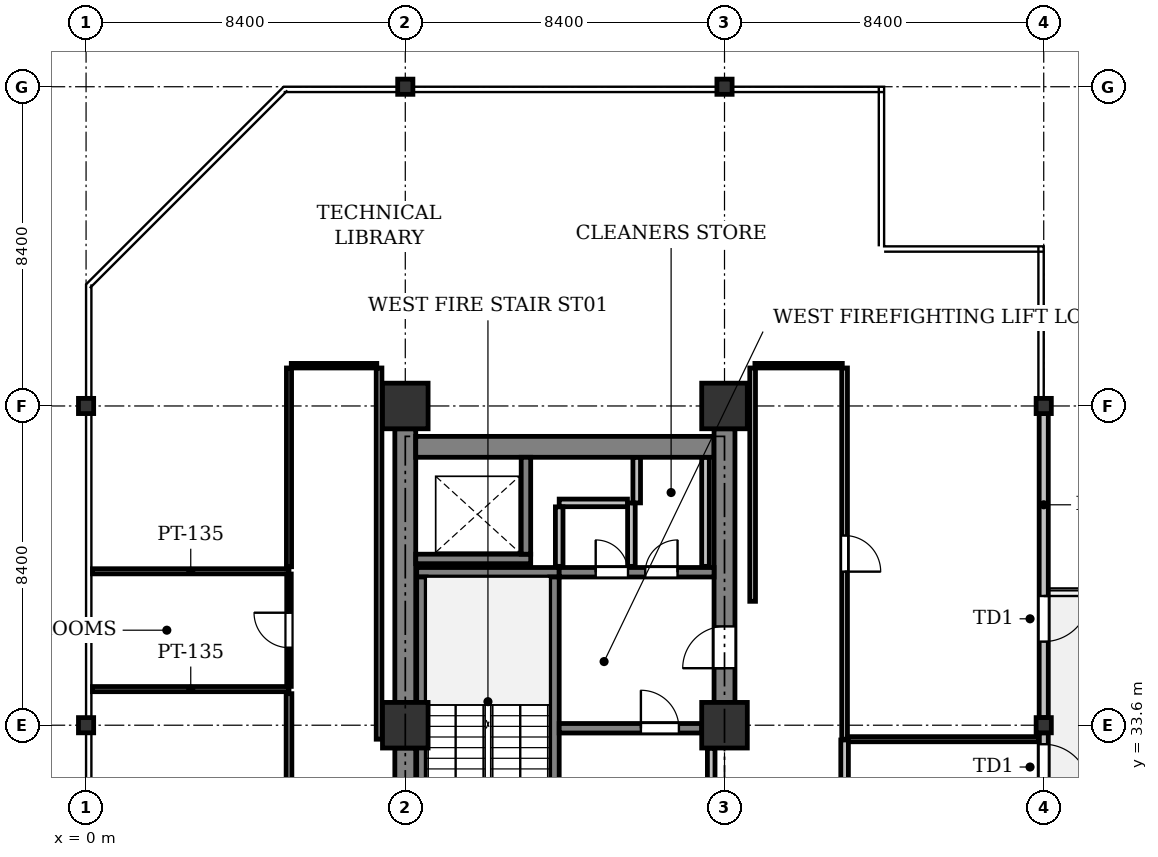
"""IFC4 building model, lengths in metres.
Left out: names, types, materials, properties, quantities, classifications, styles, units other than length and angle.
Written with IfcOpenShell. Run it as: python <this file> out.ifc"""

import sys

from ifc_helpers import new_model, si_unit, direction, frame, frame_2d, origin, origin_2d, place, context, subcontext, project, spatial, rectangle, i_section, extrude, element, fill, save


model = new_model("IFC4")
c1 = context("Model", 3, precision=1e-05, world=origin(), true_north=direction((0.0, 1.0)))
c2 = subcontext(c1, "Body", "Model", "MODEL_VIEW")
j1 = project(units=[si_unit("LENGTHUNIT", "METRE"), si_unit("PLANEANGLEUNIT", "RADIAN")], contexts=[c1])
p1 = place(None, origin())
s1 = spatial("IfcSite", under=j1, at=p1, CompositionType="ELEMENT")
p2 = place(p1, origin())
s2 = spatial("IfcBuilding", under=s1, at=p2, CompositionType="ELEMENT")
p3 = place(p2, frame((0.0, 0.0, 129.5)))
s3 = spatial("IfcBuildingStorey", under=s2, at=p3, CompositionType="ELEMENT", Elevation=129.5)
for number, where, z_axis, x_axis in (
    (1, (0.0, 33.6, 0.0), (0.0, 0.0, 1.0), (1.0, 0.0, 0.0)),
    (2, (0.0, 42.0, 0.0), (0.0, 0.0, 1.0), (1.0, 0.0, 0.0)),
):
    element("IfcColumn", number, at=place(p3, frame(where, z_axis=z_axis, x_axis=x_axis)), inside=s3, PredefinedType="COLUMN", context=c2, shape_type="SweptSolid", body=[
        extrude(i_section(OverallWidth=0.4, OverallDepth=0.4, WebThickness=0.025, FlangeThickness=0.04, at=origin_2d()), origin(), (0.0, 0.0, 1.0), 4.1),
    ])
for number, where, z_axis, x_axis in (
    (3, (8.4, 33.6, 0.0), (0.0, 0.0, 1.0), (1.0, 0.0, 0.0)),
    (4, (8.4, 42.0, 0.0), (0.0, 0.0, 1.0), (1.0, 0.0, 0.0)),
):
    element("IfcColumn", number, at=place(p3, frame(where, z_axis=z_axis, x_axis=x_axis)), inside=s3, PredefinedType="COLUMN", context=c2, shape_type="SweptSolid", body=[
        extrude(rectangle(XDim=1.2, YDim=1.2, at=origin_2d()), origin(), (0.0, 0.0, 1.0), 4.1),
    ])
p4 = place(p3, frame((8.4, 50.4, 0.0), z_axis=(0.0, 0.0, 1.0), x_axis=(1.0, 0.0, 0.0)))
e5 = element("IfcColumn", 5, at=p4, inside=s3, PredefinedType="COLUMN", context=c2, shape_type="SweptSolid", body=[
    extrude(i_section(OverallWidth=0.4, OverallDepth=0.4, WebThickness=0.025, FlangeThickness=0.04, at=origin_2d()), origin(), (0.0, 0.0, 1.0), 4.1),
])
for number, where, z_axis, x_axis in (
    (6, (16.8, 33.6, 0.0), (0.0, 0.0, 1.0), (1.0, 0.0, 0.0)),
    (7, (16.8, 42.0, 0.0), (0.0, 0.0, 1.0), (1.0, 0.0, 0.0)),
):
    element("IfcColumn", number, at=place(p3, frame(where, z_axis=z_axis, x_axis=x_axis)), inside=s3, PredefinedType="COLUMN", context=c2, shape_type="SweptSolid", body=[
        extrude(rectangle(XDim=1.2, YDim=1.2, at=origin_2d()), origin(), (0.0, 0.0, 1.0), 4.1),
    ])
for number, where, z_axis, x_axis in (
    (8, (16.8, 50.4, 0.0), (0.0, 0.0, 1.0), (1.0, 0.0, 0.0)),
    (9, (25.2, 33.6, 0.0), (0.0, 0.0, 1.0), (1.0, 0.0, 0.0)),
    (10, (25.2, 42.0, 0.0), (0.0, 0.0, 1.0), (1.0, 0.0, 0.0)),
):
    element("IfcColumn", number, at=place(p3, frame(where, z_axis=z_axis, x_axis=x_axis)), inside=s3, PredefinedType="COLUMN", context=c2, shape_type="SweptSolid", body=[
        extrude(i_section(OverallWidth=0.4, OverallDepth=0.4, WebThickness=0.025, FlangeThickness=0.04, at=origin_2d()), origin(), (0.0, 0.0, 1.0), 4.1),
    ])
p5 = place(p3, frame((25.2, 41.8, 0.0), z_axis=(0.0, 0.0, 1.0), x_axis=(0.0, -1.0, 0.0)))
e11 = element("IfcWall", 11, at=p5, inside=s3, PredefinedType="STANDARD", context=c2, shape_type="SweptSolid", body=[
    extrude(rectangle(XDim=8.0, YDim=0.24, at=frame_2d((4.0, 0.0))), origin(), (0.0, 0.0, 1.0), 3.422),
])
p6 = place(p5, frame((4.8, 0.0, 0.0)))
e12 = element("IfcOpeningElement", 12, at=p6, cuts=e11, PredefinedType="OPENING", context=c2, shape_type="SweptSolid", body=[
    extrude(rectangle(XDim=1.2, YDim=2.2, at=frame_2d((0.6, 1.1))), frame((0.0, 0.13, 0.0), z_axis=(0.0, -1.0, 0.0), x_axis=(1.0, 0.0, 0.0)), (0.0, 0.0, 1.0), 0.26),
])
p7 = place(p3, frame((25.2, 33.4, 0.0), z_axis=(0.0, 0.0, 1.0), x_axis=(0.0, -1.0, 0.0)))
e13 = element("IfcWall", 13, at=p7, inside=s3, PredefinedType="STANDARD", context=c2, shape_type="SweptSolid", body=[
    extrude(rectangle(XDim=8.0, YDim=0.24, at=frame_2d((4.0, 0.0))), origin(), (0.0, 0.0, 1.0), 3.422),
])
p8 = place(p7, frame((0.3, 0.0, 0.0)))
e14 = element("IfcOpeningElement", 14, at=p8, cuts=e13, PredefinedType="OPENING", context=c2, shape_type="SweptSolid", body=[
    extrude(rectangle(XDim=1.2, YDim=2.2, at=frame_2d((0.6, 1.1))), frame((0.0, 0.13, 0.0), z_axis=(0.0, -1.0, 0.0), x_axis=(1.0, 0.0, 0.0)), (0.0, 0.0, 1.0), 0.26),
])
p9 = place(p7, frame((3.299, 0.0, 0.9)))
e15 = element("IfcOpeningElement", 15, at=p9, cuts=e13, PredefinedType="OPENING", context=c2, shape_type="SweptSolid", body=[
    extrude(rectangle(XDim=1.5, YDim=1.6, at=frame_2d((0.75, 0.8))), frame((0.0, 0.13, 0.0), z_axis=(0.0, -1.0, 0.0), x_axis=(1.0, 0.0, 0.0)), (0.0, 0.0, 1.0), 0.26),
])
for number, where, z_axis, x_axis in (
    (16, (8.4, 25.8, 0.0), (0.0, 0.0, 1.0), (0.0, 1.0, 0.0)),
    (17, (8.4, 34.2, 0.0), (0.0, 0.0, 1.0), (0.0, 1.0, 0.0)),
):
    element("IfcWall", number, at=place(p3, frame(where, z_axis=z_axis, x_axis=x_axis)), inside=s3, PredefinedType="SHEAR", context=c2, shape_type="SweptSolid", body=[
        extrude(rectangle(XDim=7.2, YDim=0.55, at=frame_2d((3.6, 0.0))), origin(), (0.0, 0.0, 1.0), 3.825),
    ])
p10 = place(p3, frame((8.675, 40.925, 0.0), z_axis=(0.0, 0.0, 1.0), x_axis=(1.0, 0.0, 0.0)))
e18 = element("IfcWall", 18, at=p10, inside=s3, PredefinedType="SHEAR", context=c2, shape_type="SweptSolid", body=[
    extrude(rectangle(XDim=7.85, YDim=0.55, at=frame_2d((3.925, 0.0))), origin(), (0.0, 0.0, 1.0), 3.825),
])
p11 = place(p3, frame((16.8, 34.2, 0.0), z_axis=(0.0, 0.0, 1.0), x_axis=(0.0, 1.0, 0.0)))
e19 = element("IfcWall", 19, at=p11, inside=s3, PredefinedType="SHEAR", context=c2, shape_type="SweptSolid", body=[
    extrude(rectangle(XDim=7.2, YDim=0.55, at=frame_2d((3.6, 0.0))), origin(), (0.0, 0.0, 1.0), 3.825),
])
p12 = place(p11, frame((0.9, 0.0, 0.0)))
e20 = element("IfcOpeningElement", 20, at=p12, cuts=e19, PredefinedType="OPENING", context=c2, shape_type="SweptSolid", body=[
    extrude(rectangle(XDim=1.1, YDim=2.15, at=frame_2d((0.55, 1.075))), frame((0.0, 0.285, 0.0), z_axis=(0.0, -1.0, 0.0), x_axis=(1.0, 0.0, 0.0)), (0.0, 0.0, 1.0), 0.57),
])
p13 = place(p3, frame((12.45, 37.625, 0.0), z_axis=(0.0, 0.0, 1.0), x_axis=(-1.0, 0.0, 0.0)))
e21 = element("IfcWall", 21, at=p13, inside=s3, PredefinedType="SHEAR", context=c2, shape_type="SweptSolid", body=[
    extrude(rectangle(XDim=3.75, YDim=0.25, at=frame_2d((1.875, 0.0))), origin(), (0.0, 0.0, 1.0), 3.825),
])
p14 = place(p3, frame((12.325, 29.75, 0.0), z_axis=(0.0, 0.0, 1.0), x_axis=(0.0, 1.0, 0.0)))
e22 = element("IfcWall", 22, at=p14, inside=s3, PredefinedType="SHEAR", context=c2, shape_type="SweptSolid", body=[
    extrude(rectangle(XDim=7.75, YDim=0.25, at=frame_2d((3.875, 0.0))), origin(), (0.0, 0.0, 1.0), 3.825),
])
p15 = place(p14, frame((0.22, 0.0, 0.0)))
e23 = element("IfcOpeningElement", 23, at=p15, cuts=e22, PredefinedType="OPENING", context=c2, shape_type="SweptSolid", body=[
    extrude(rectangle(XDim=1.1, YDim=2.15, at=frame_2d((0.55, 1.075))), frame((0.0, 0.135, 0.0), z_axis=(0.0, -1.0, 0.0), x_axis=(1.0, 0.0, 0.0)), (0.0, 0.0, 1.0), 0.27),
])
p16 = place(p3, frame((8.825, 29.75, 0.0), z_axis=(0.0, 0.0, 1.0), x_axis=(0.0, 1.0, 0.0)))
e24 = element("IfcWall", 24, at=p16, inside=s3, PredefinedType="SHEAR", context=c2, shape_type="SweptSolid", body=[
    extrude(rectangle(XDim=7.75, YDim=0.25, at=frame_2d((3.875, 0.0))), origin(), (0.0, 0.0, 1.0), 3.825),
])
p17 = place(p3, frame((8.675, 37.975, 0.0), z_axis=(0.0, 0.0, 1.0), x_axis=(1.0, 0.0, 0.0)))
e25 = element("IfcWall", 25, at=p17, inside=s3, PredefinedType="SHEAR", context=c2, shape_type="SweptSolid", body=[
    extrude(rectangle(XDim=3.025, YDim=0.25, at=frame_2d((1.512, 0.0))), origin(), (0.0, 0.0, 1.0), 3.825),
])
p18 = place(p3, frame((11.575, 38.1, 0.0), z_axis=(0.0, 0.0, 1.0), x_axis=(0.0, 1.0, 0.0)))
e26 = element("IfcWall", 26, at=p18, inside=s3, PredefinedType="SHEAR", context=c2, shape_type="SweptSolid", body=[
    extrude(rectangle(XDim=2.55, YDim=0.25, at=frame_2d((1.275, 0.0))), origin(), (0.0, 0.0, 1.0), 3.825),
])
p19 = place(p3, frame((12.45, 33.52, 0.0), z_axis=(0.0, 0.0, 1.0), x_axis=(1.0, 0.0, 0.0)))
e27 = element("IfcWall", 27, at=p19, inside=s3, PredefinedType="SHEAR", context=c2, shape_type="SweptSolid", body=[
    extrude(rectangle(XDim=3.75, YDim=0.25, at=frame_2d((1.875, 0.0))), origin(), (0.0, 0.0, 1.0), 3.825),
])
p20 = place(p19, frame((2.15, 0.0, 0.0)))
e28 = element("IfcOpeningElement", 28, at=p20, cuts=e27, PredefinedType="OPENING", context=c2, shape_type="SweptSolid", body=[
    extrude(rectangle(XDim=1.0, YDim=2.15, at=frame_2d((0.5, 1.075))), frame((0.0, 0.135, 0.0), z_axis=(0.0, -1.0, 0.0), x_axis=(1.0, 0.0, 0.0)), (0.0, 0.0, 1.0), 0.27),
])
p21 = place(p3, frame((12.45, 37.625, 0.0), z_axis=(0.0, 0.0, 1.0), x_axis=(1.0, 0.0, 0.0)))
e29 = element("IfcWall", 29, at=p21, inside=s3, PredefinedType="SHEAR", context=c2, shape_type="SweptSolid", body=[
    extrude(rectangle(XDim=4.075, YDim=0.25, at=frame_2d((2.038, 0.0))), origin(), (0.0, 0.0, 1.0), 3.825),
])
p22 = place(p21, frame((0.96, 0.0, 0.0)))
e30 = element("IfcOpeningElement", 30, at=p22, cuts=e29, PredefinedType="OPENING", context=c2, shape_type="SweptSolid", body=[
    extrude(rectangle(XDim=0.85, YDim=2.15, at=frame_2d((0.425, 1.075))), frame((0.0, 0.135, 0.0), z_axis=(0.0, -1.0, 0.0), x_axis=(1.0, 0.0, 0.0)), (0.0, 0.0, 1.0), 0.27),
])
p23 = place(p21, frame((2.264, 0.0, 0.0)))
e31 = element("IfcOpeningElement", 31, at=p23, cuts=e29, PredefinedType="OPENING", context=c2, shape_type="SweptSolid", body=[
    extrude(rectangle(XDim=0.85, YDim=2.15, at=frame_2d((0.425, 1.075))), frame((0.0, 0.135, 0.0), z_axis=(0.0, -1.0, 0.0), x_axis=(1.0, 0.0, 0.0)), (0.0, 0.0, 1.0), 0.27),
])
p24 = place(p3, frame((16.45, 31.0, 0.0), z_axis=(0.0, 0.0, 1.0), x_axis=(0.0, 1.0, 0.0)))
e32 = element("IfcWall", 32, at=p24, inside=s3, PredefinedType="PARTITIONING", context=c2, shape_type="SweptSolid", body=[
    extrude(rectangle(XDim=1.995, YDim=0.2, at=frame_2d((0.998, 0.0))), origin(), (0.0, 0.0, 1.0), 3.825),
])
p25 = place(p3, frame((14.35, 37.78, 0.0), z_axis=(0.0, 0.0, 1.0), x_axis=(0.0, 1.0, 0.0)))
e33 = element("IfcWall", 33, at=p25, inside=s3, PredefinedType="PARTITIONING", context=c2, shape_type="SweptSolid", body=[
    extrude(rectangle(XDim=1.67, YDim=0.2, at=frame_2d((0.835, 0.0))), origin(), (0.0, 0.0, 1.0), 2.725),
])
p26 = place(p3, frame((14.246, 39.45, 0.0), z_axis=(0.0, 0.0, 1.0), x_axis=(-1.0, 0.0, 0.0)))
e34 = element("IfcWall", 34, at=p26, inside=s3, PredefinedType="PARTITIONING", context=c2, shape_type="SweptSolid", body=[
    extrude(rectangle(XDim=1.796, YDim=0.2, at=frame_2d((0.898, 0.0))), origin(), (0.0, 0.0, 1.0), 2.725),
])
p27 = place(p3, frame((12.45, 39.346, 0.0), z_axis=(0.0, 0.0, 1.0), x_axis=(0.0, -1.0, 0.0)))
e35 = element("IfcWall", 35, at=p27, inside=s3, PredefinedType="PARTITIONING", context=c2, shape_type="SweptSolid", body=[
    extrude(rectangle(XDim=1.566, YDim=0.2, at=frame_2d((0.783, 0.0))), origin(), (0.0, 0.0, 1.0), 2.725),
])
p28 = place(p3, frame((16.3, 37.78, 0.0), z_axis=(0.0, 0.0, 1.0), x_axis=(0.0, 1.0, 0.0)))
e36 = element("IfcWall", 36, at=p28, inside=s3, PredefinedType="PARTITIONING", context=c2, shape_type="SweptSolid", body=[
    extrude(rectangle(XDim=2.866, YDim=0.2, at=frame_2d((1.433, 0.0))), origin(), (0.0, 0.0, 1.0), 2.725),
])
p29 = place(p3, frame((14.49, 40.646, 0.0), z_axis=(0.0, 0.0, 1.0), x_axis=(0.0, -1.0, 0.0)))
e37 = element("IfcWall", 37, at=p29, inside=s3, PredefinedType="PARTITIONING", context=c2, shape_type="SweptSolid", body=[
    extrude(rectangle(XDim=1.196, YDim=0.2, at=frame_2d((0.598, 0.0))), origin(), (0.0, 0.0, 1.0), 2.725),
])
for number, where, z_axis, x_axis in (
    (38, (5.34, 37.65, 0.0), (0.0, 0.0, 1.0), (-1.0, 0.0, 0.0)),
    (39, (0.169, 34.55, 0.0), (0.0, 0.0, 1.0), (1.0, 0.0, 0.0)),
):
    element("IfcWall", number, at=place(p3, frame(where, z_axis=z_axis, x_axis=x_axis)), inside=s3, PredefinedType="PARTITIONING", context=c2, shape_type="SweptSolid", body=[
        extrude(rectangle(XDim=5.171, YDim=0.135, at=frame_2d((2.585, 0.0))), origin(), (0.0, 0.0, 1.0), 3.469),
    ])
p30 = place(p3, frame((5.34, 34.622, 0.0), z_axis=(0.0, 0.0, 1.0), x_axis=(0.0, 1.0, 0.0)))
e40 = element("IfcWall", 40, at=p30, inside=s3, PredefinedType="PARTITIONING", context=c2, shape_type="SweptSolid", body=[
    extrude(rectangle(XDim=2.957, YDim=0.12, at=frame_2d((1.479, 0.0))), origin(), (0.0, 0.0, 1.0), 3.825),
])
p31 = place(p30, frame((1.019, 0.0, 0.0)))
e41 = element("IfcOpeningElement", 41, at=p31, cuts=e40, PredefinedType="OPENING", context=c2, shape_type="SweptSolid", body=[
    extrude(rectangle(XDim=0.92, YDim=2.1, at=frame_2d((0.46, 1.05))), frame((0.0, 0.07, 0.0), z_axis=(0.0, -1.0, 0.0), x_axis=(1.0, 0.0, 0.0)), (0.0, 0.0, 1.0), 0.14),
])
p32 = place(p3, frame((5.34, 27.263, 0.0), z_axis=(0.0, 0.0, 1.0), x_axis=(0.0, 1.0, 0.0)))
e42 = element("IfcWall", 42, at=p32, inside=s3, PredefinedType="PARTITIONING", context=c2, shape_type="SweptSolid", body=[
    extrude(rectangle(XDim=7.167, YDim=0.15, at=frame_2d((3.583, 0.0))), origin(), (0.0, 0.0, 1.0), 3.292),
])
p33 = place(p32, frame((3.108, 0.0, 0.0)))
e43 = element("IfcOpeningElement", 43, at=p33, cuts=e42, PredefinedType="OPENING", context=c2, shape_type="SweptSolid", body=[
    extrude(rectangle(XDim=0.95, YDim=2.15, at=frame_2d((0.475, 1.075))), frame((0.0, 0.085, 0.0), z_axis=(0.0, -1.0, 0.0), x_axis=(1.0, 0.0, 0.0)), (0.0, 0.0, 1.0), 0.17),
])
p34 = place(p3, frame((19.96, 43.0, 0.0), z_axis=(0.0, 0.0, 1.0), x_axis=(0.0, -1.0, 0.0)))
e44 = element("IfcWall", 44, at=p34, inside=s3, PredefinedType="PARTITIONING", context=c2, shape_type="SweptSolid", body=[
    extrude(rectangle(XDim=9.768, YDim=0.15, at=frame_2d((4.884, 0.0))), origin(), (0.0, 0.0, 1.0), 3.292),
])
p35 = place(p34, frame((4.409, 0.0, 0.0)))
e45 = element("IfcOpeningElement", 45, at=p35, cuts=e44, PredefinedType="OPENING", context=c2, shape_type="SweptSolid", body=[
    extrude(rectangle(XDim=0.95, YDim=2.15, at=frame_2d((0.475, 1.075))), frame((0.0, 0.085, 0.0), z_axis=(0.0, -1.0, 0.0), x_axis=(1.0, 0.0, 0.0)), (0.0, 0.0, 1.0), 0.17),
])
p36 = place(p3, frame((20.039, 33.232, 0.0), z_axis=(0.0, 0.0, 1.0), x_axis=(1.0, 0.0, 0.0)))
e46 = element("IfcWall", 46, at=p36, inside=s3, PredefinedType="PARTITIONING", context=c2, shape_type="SweptSolid", body=[
    extrude(rectangle(XDim=5.037, YDim=0.135, at=frame_2d((2.519, 0.0))), origin(), (0.0, 0.0, 1.0), 3.469),
])
p37 = place(p3, frame((5.34, 37.77, 0.0), z_axis=(0.0, 0.0, 1.0), x_axis=(0.0, 1.0, 0.0)))
e47 = element("IfcWall", 47, at=p37, inside=s3, PredefinedType="PARTITIONING", context=c2, shape_type="SweptSolid", body=[
    extrude(rectangle(XDim=5.23, YDim=0.135, at=frame_2d((2.615, 0.0))), origin(), (0.0, 0.0, 1.0), 3.292),
])
p38 = place(p3, frame((5.4, 43.06, 0.0), z_axis=(0.0, 0.0, 1.0), x_axis=(1.0, 0.0, 0.0)))
e48 = element("IfcWall", 48, at=p38, inside=s3, PredefinedType="PARTITIONING", context=c2, shape_type="SweptSolid", body=[
    extrude(rectangle(XDim=2.25, YDim=0.12, at=frame_2d((1.125, 0.0))), origin(), (0.0, 0.0, 1.0), 3.825),
])
p39 = place(p3, frame((7.71, 43.0, 0.0), z_axis=(0.0, 0.0, 1.0), x_axis=(0.0, -1.0, 0.0)))
e49 = element("IfcWall", 49, at=p39, inside=s3, PredefinedType="PARTITIONING", context=c2, shape_type="SweptSolid", body=[
    extrude(rectangle(XDim=9.768, YDim=0.15, at=frame_2d((4.884, 0.0))), origin(), (0.0, 0.0, 1.0), 3.292),
])
p40 = place(p3, frame((17.54, 36.86, 0.0), z_axis=(0.0, 0.0, 1.0), x_axis=(0.0, 1.0, 0.0)))
e50 = element("IfcWall", 50, at=p40, inside=s3, PredefinedType="PARTITIONING", context=c2, shape_type="SweptSolid", body=[
    extrude(rectangle(XDim=6.14, YDim=0.15, at=frame_2d((3.07, 0.0))), origin(), (0.0, 0.0, 1.0), 3.292),
])
p41 = place(p3, frame((17.6, 43.06, 0.0), z_axis=(0.0, 0.0, 1.0), x_axis=(1.0, 0.0, 0.0)))
e51 = element("IfcWall", 51, at=p41, inside=s3, PredefinedType="PARTITIONING", context=c2, shape_type="SweptSolid", body=[
    extrude(rectangle(XDim=2.3, YDim=0.12, at=frame_2d((1.15, 0.0))), origin(), (0.0, 0.0, 1.0), 3.825),
])
p42 = place(p3, frame((19.96, 33.212, 0.0), z_axis=(0.0, 0.0, 1.0), x_axis=(0.0, -1.0, 0.0)))
e52 = element("IfcWall", 52, at=p42, inside=s3, PredefinedType="PARTITIONING", context=c2, shape_type="SweptSolid", body=[
    extrude(rectangle(XDim=7.952, YDim=0.2, at=frame_2d((3.976, 0.0))), origin(), (0.0, 0.0, 1.0), 3.292),
])
p43 = place(p42, frame((3.476, 0.0, 0.0)))
e53 = element("IfcOpeningElement", 53, at=p43, cuts=e52, PredefinedType="OPENING", context=c2, shape_type="SweptSolid", body=[
    extrude(rectangle(XDim=1.0, YDim=2.15, at=frame_2d((0.5, 1.075))), frame((0.0, 0.11, 0.0), z_axis=(0.0, -1.0, 0.0), x_axis=(1.0, 0.0, 0.0)), (0.0, 0.0, 1.0), 0.22),
])
p44 = place(p6, origin())
e54 = element("IfcDoor", 54, at=p44, inside=s3, OperationType="SINGLE_SWING_LEFT", PredefinedType="DOOR", context=c2, shape_type="SweptSolid", body=[
    extrude(rectangle(XDim=1.2, YDim=2.2, at=frame_2d((0.6, 1.1))), frame((0.0, 0.025, 0.0), z_axis=(0.0, -1.0, 0.0), x_axis=(1.0, 0.0, 0.0)), (0.0, 0.0, 1.0), 0.05),
])
fill(e12, e54)
p45 = place(p8, origin())
e55 = element("IfcDoor", 55, at=p45, inside=s3, OperationType="SINGLE_SWING_RIGHT", PredefinedType="DOOR", context=c2, shape_type="SweptSolid", body=[
    extrude(rectangle(XDim=1.2, YDim=2.2, at=frame_2d((0.6, 1.1))), frame((0.0, 0.025, 0.0), z_axis=(0.0, -1.0, 0.0), x_axis=(1.0, 0.0, 0.0)), (0.0, 0.0, 1.0), 0.05),
])
fill(e14, e55)
p46 = place(p12, origin())
e56 = element("IfcDoor", 56, at=p46, inside=s3, OperationType="SINGLE_SWING_LEFT", PredefinedType="DOOR", context=c2, shape_type="SweptSolid", body=[
    extrude(rectangle(XDim=1.1, YDim=2.15, at=frame_2d((0.55, 1.075))), frame((0.0, 0.025, 0.0), z_axis=(0.0, -1.0, 0.0), x_axis=(1.0, 0.0, 0.0)), (0.0, 0.0, 1.0), 0.05),
])
fill(e20, e56)
p47 = place(p20, origin())
e57 = element("IfcDoor", 57, at=p47, inside=s3, OperationType="SINGLE_SWING_LEFT", PredefinedType="DOOR", context=c2, shape_type="SweptSolid", body=[
    extrude(rectangle(XDim=1.0, YDim=2.15, at=frame_2d((0.5, 1.075))), frame((0.0, 0.025, 0.0), z_axis=(0.0, -1.0, 0.0), x_axis=(1.0, 0.0, 0.0)), (0.0, 0.0, 1.0), 0.05),
])
fill(e28, e57)
p48 = place(p22, origin())
e58 = element("IfcDoor", 58, at=p48, inside=s3, OperationType="SINGLE_SWING_LEFT", PredefinedType="DOOR", context=c2, shape_type="SweptSolid", body=[
    extrude(rectangle(XDim=0.85, YDim=2.15, at=frame_2d((0.425, 1.075))), frame((0.0, 0.025, 0.0), z_axis=(0.0, -1.0, 0.0), x_axis=(1.0, 0.0, 0.0)), (0.0, 0.0, 1.0), 0.05),
])
fill(e30, e58)
p49 = place(p23, origin())
e59 = element("IfcDoor", 59, at=p49, inside=s3, OperationType="SINGLE_SWING_RIGHT", PredefinedType="DOOR", context=c2, shape_type="SweptSolid", body=[
    extrude(rectangle(XDim=0.85, YDim=2.15, at=frame_2d((0.425, 1.075))), frame((0.0, 0.025, 0.0), z_axis=(0.0, -1.0, 0.0), x_axis=(1.0, 0.0, 0.0)), (0.0, 0.0, 1.0), 0.05),
])
fill(e31, e59)
p50 = place(p31, origin())
e60 = element("IfcDoor", 60, at=p50, inside=s3, OperationType="SINGLE_SWING_RIGHT", PredefinedType="DOOR", context=c2, shape_type="SweptSolid", body=[
    extrude(rectangle(XDim=0.92, YDim=2.1, at=frame_2d((0.46, 1.05))), frame((0.0, 0.025, 0.0), z_axis=(0.0, -1.0, 0.0), x_axis=(1.0, 0.0, 0.0)), (0.0, 0.0, 1.0), 0.05),
])
fill(e41, e60)
p51 = place(p35, origin())
e61 = element("IfcDoor", 61, at=p51, inside=s3, OperationType="SINGLE_SWING_RIGHT", PredefinedType="DOOR", context=c2, shape_type="SweptSolid", body=[
    extrude(rectangle(XDim=0.95, YDim=2.15, at=frame_2d((0.475, 1.075))), frame((0.0, 0.025, 0.0), z_axis=(0.0, -1.0, 0.0), x_axis=(1.0, 0.0, 0.0)), (0.0, 0.0, 1.0), 0.05),
])
fill(e45, e61)
save(model, sys.argv[1])
